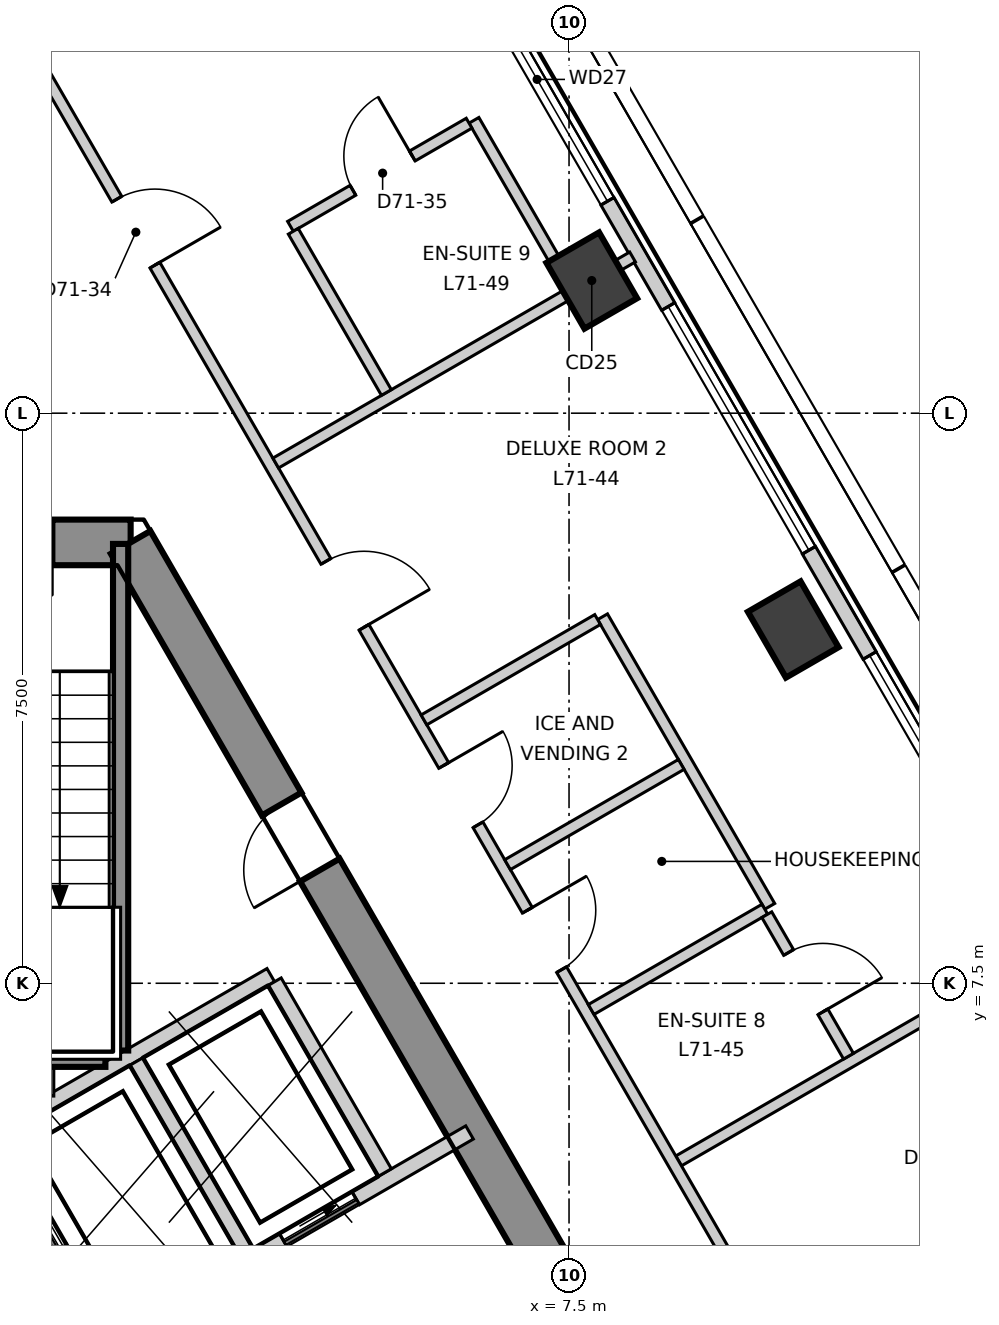
"""IFC4 building model, lengths in metres.
Left out: names, types, materials, properties, quantities, classifications, styles, units other than length and angle.
Written with IfcOpenShell. Run it as: python <this file> out.ifc"""

import sys

from ifc_helpers import new_model, si_unit, direction, frame, frame_2d, origin, origin_2d, place, context, subcontext, project, spatial, polyline, rectangle, outline, extrude, element, fill, save


model = new_model("IFC4")
c1 = context("Model", 3, precision=1e-05, world=origin(), true_north=direction((0.0, 1.0)))
c2 = subcontext(c1, "Body", "Model", "MODEL_VIEW")
j1 = project(units=[si_unit("LENGTHUNIT", "METRE"), si_unit("PLANEANGLEUNIT", "RADIAN")], contexts=[c1])
p1 = place(None, origin())
s1 = spatial("IfcSite", under=j1, at=p1, CompositionType="ELEMENT")
p2 = place(p1, origin())
s2 = spatial("IfcBuilding", under=s1, at=p2, CompositionType="ELEMENT")
p3 = place(p2, frame((0.0, 0.0, 300.7)))
s3 = spatial("IfcBuildingStorey", under=s2, at=p3, CompositionType="ELEMENT", Elevation=300.7)
p4 = place(p3, frame((1.732, 13.3, -0.3), z_axis=(0.0, 0.0, 1.0), x_axis=(-1.0, 0.0, 0.0)))
e1 = element("IfcWall", 1, at=p4, inside=s3, PredefinedType="SHEAR", context=c2, shape_type="SweptSolid", body=[
    extrude(outline(polyline([(-0.173, -0.3), (1.732, -0.3), (3.637, -0.3), (3.291, 0.3), (1.732, 0.3), (0.173, 0.3), (-0.173, -0.3)])), origin(), (0.0, 0.0, 1.0), 3.6),
])
p5 = place(p4, frame((1.032, 0.0, 0.3)))
e2 = element("IfcOpeningElement", 2, at=p5, cuts=e1, PredefinedType="OPENING", context=c2, shape_type="SweptSolid", body=[
    extrude(rectangle(XDim=1.4, YDim=2.1, at=frame_2d((0.7, 1.05))), frame((0.0, 0.31, 0.0), z_axis=(0.0, -1.0, 0.0), x_axis=(1.0, 0.0, 0.0)), (0.0, 0.0, 1.0), 0.62),
])
p6 = place(p3, frame((12.384, -5.15, -0.3), z_axis=(0.0, 0.0, 1.0), x_axis=(-0.500000539815, 0.866025092122, 0.0)))
e3 = element("IfcWall", 3, at=p6, inside=s3, PredefinedType="SHEAR", context=c2, shape_type="SweptSolid", body=[
    extrude(outline(polyline([(-0.173, -0.301), (1.795, -0.301), (3.763, -0.301), (5.731, -0.301), (7.7, -0.301), (9.668, -0.301), (11.636, -0.301), (13.604, -0.3), (15.573, -0.3), (17.541, -0.3), (19.509, -0.3), (21.477, -0.3), (21.131, 0.3), (19.226, 0.3), (17.321, 0.3), (15.415, 0.3), (13.51, 0.3), (11.605, 0.3), (9.699, 0.3), (7.794, 0.3), (5.889, 0.3), (3.984, 0.3), (2.078, 0.3), (0.173, 0.3), (-0.173, -0.301)])), origin(), (0.0, 0.0, 1.0), 3.6),
])
p7 = place(p6, frame((16.328, 0.0, 0.3)))
e4 = element("IfcOpeningElement", 4, at=p7, cuts=e3, PredefinedType="OPENING", context=c2, shape_type="SweptSolid", body=[
    extrude(rectangle(XDim=1.0, YDim=2.1, at=frame_2d((0.5, 1.05))), frame((0.0, 0.31, 0.0), z_axis=(0.0, -1.0, 0.0), x_axis=(1.0, 0.0, 0.0)), (0.0, 0.0, 1.0), 0.621),
])
p8 = place(p6, frame((4.777, 0.0, 0.3)))
e5 = element("IfcOpeningElement", 5, at=p8, cuts=e3, PredefinedType="OPENING", context=c2, shape_type="SweptSolid", body=[
    extrude(rectangle(XDim=0.9, YDim=2.1, at=frame_2d((0.45, 1.05))), frame((0.0, 0.31, 0.0), z_axis=(0.0, -1.0, 0.0), x_axis=(1.0, 0.0, 0.0)), (0.0, 0.0, 1.0), 0.621),
])
for number, where, z_axis, x_axis in (
    (6, (10.45, 12.154, -0.3), (0.0, 0.0, 1.0), (-0.5, 0.866, 0.0)),
    (7, (7.799, 16.745, -0.3), (0.0, 0.0, 1.0), (-0.5, 0.866, 0.0)),
):
    element("IfcColumn", number, at=place(p3, frame(where, z_axis=z_axis, x_axis=x_axis)), inside=s3, PredefinedType="COLUMN", context=c2, shape_type="SweptSolid", body=[
        extrude(rectangle(XDim=1.0, YDim=0.8, at=origin_2d()), origin(), (0.0, 0.0, 1.0), 3.6),
    ])
p9 = place(p3, frame((24.96, -11.578, 0.0), z_axis=(0.0, 0.0, 1.0), x_axis=(-0.500002391419, 0.866024023094, 0.0)))
e8 = element("IfcWall", 8, at=p9, inside=s3, PredefinedType="ELEMENTEDWALL", context=c2, shape_type="SweptSolid", body=[
    extrude(rectangle(XDim=44.994, YDim=0.2, at=frame_2d((22.497, 0.0))), origin(), (0.0, 0.0, 1.0), 3.3),
])
p10 = place(p9, frame((2.103, 0.0, 0.9)))
e9 = element("IfcOpeningElement", 9, at=p10, cuts=e8, PredefinedType="OPENING", context=c2, shape_type="SweptSolid", body=[
    extrude(rectangle(XDim=3.7, YDim=2.2, at=frame_2d((1.85, 1.1))), frame((0.0, 0.11, 0.0), z_axis=(0.0, -1.0, 0.0), x_axis=(1.0, 0.0, 0.0)), (0.0, 0.0, 1.0), 0.22),
])
p11 = place(p9, frame((7.404, 0.0, 0.9)))
e10 = element("IfcOpeningElement", 10, at=p11, cuts=e8, PredefinedType="OPENING", context=c2, shape_type="SweptSolid", body=[
    extrude(rectangle(XDim=3.7, YDim=2.2, at=frame_2d((1.85, 1.1))), frame((0.0, 0.11, 0.0), z_axis=(0.0, -1.0, 0.0), x_axis=(1.0, 0.0, 0.0)), (0.0, 0.0, 1.0), 0.22),
])
p12 = place(p9, frame((12.705, 0.0, 0.9)))
e11 = element("IfcOpeningElement", 11, at=p12, cuts=e8, PredefinedType="OPENING", context=c2, shape_type="SweptSolid", body=[
    extrude(rectangle(XDim=3.7, YDim=2.2, at=frame_2d((1.85, 1.1))), frame((0.0, 0.11, 0.0), z_axis=(0.0, -1.0, 0.0), x_axis=(1.0, 0.0, 0.0)), (0.0, 0.0, 1.0), 0.22),
])
p13 = place(p9, frame((18.006, 0.0, 0.9)))
e12 = element("IfcOpeningElement", 12, at=p13, cuts=e8, PredefinedType="OPENING", context=c2, shape_type="SweptSolid", body=[
    extrude(rectangle(XDim=3.7, YDim=2.2, at=frame_2d((1.85, 1.1))), frame((0.0, 0.11, 0.0), z_axis=(0.0, -1.0, 0.0), x_axis=(1.0, 0.0, 0.0)), (0.0, 0.0, 1.0), 0.22),
])
p14 = place(p9, frame((23.308, 0.0, 0.9)))
e13 = element("IfcOpeningElement", 13, at=p14, cuts=e8, PredefinedType="OPENING", context=c2, shape_type="SweptSolid", body=[
    extrude(rectangle(XDim=3.7, YDim=2.2, at=frame_2d((1.85, 1.1))), frame((0.0, 0.11, 0.0), z_axis=(0.0, -1.0, 0.0), x_axis=(1.0, 0.0, 0.0)), (0.0, 0.0, 1.0), 0.22),
])
p15 = place(p9, frame((28.609, 0.0, 0.9)))
e14 = element("IfcOpeningElement", 14, at=p15, cuts=e8, PredefinedType="OPENING", context=c2, shape_type="SweptSolid", body=[
    extrude(rectangle(XDim=3.7, YDim=2.2, at=frame_2d((1.85, 1.1))), frame((0.0, 0.11, 0.0), z_axis=(0.0, -1.0, 0.0), x_axis=(1.0, 0.0, 0.0)), (0.0, 0.0, 1.0), 0.22),
])
p16 = place(p9, frame((33.91, 0.0, 0.9)))
e15 = element("IfcOpeningElement", 15, at=p16, cuts=e8, PredefinedType="OPENING", context=c2, shape_type="SweptSolid", body=[
    extrude(rectangle(XDim=3.7, YDim=2.2, at=frame_2d((1.85, 1.1))), frame((0.0, 0.11, 0.0), z_axis=(0.0, -1.0, 0.0), x_axis=(1.0, 0.0, 0.0)), (0.0, 0.0, 1.0), 0.22),
])
p17 = place(p9, frame((39.211, 0.0, 0.9)))
e16 = element("IfcOpeningElement", 16, at=p17, cuts=e8, PredefinedType="OPENING", context=c2, shape_type="SweptSolid", body=[
    extrude(rectangle(XDim=3.7, YDim=2.2, at=frame_2d((1.85, 1.1))), frame((0.0, 0.11, 0.0), z_axis=(0.0, -1.0, 0.0), x_axis=(1.0, 0.0, 0.0)), (0.0, 0.0, 1.0), 0.22),
])
p18 = place(p3, frame((8.942, 5.163, 0.0), z_axis=(0.0, 0.0, 1.0), x_axis=(0.866006352826, 0.500032995777, 0.0)))
e17 = element("IfcWall", 17, at=p18, inside=s3, PredefinedType="PARTITIONING", context=c2, shape_type="SweptSolid", body=[
    extrude(rectangle(XDim=5.422, YDim=0.15, at=frame_2d((2.711, 0.0))), origin(), (0.0, 0.0, 1.0), 2.8),
])
p19 = place(p3, frame((0.075, 20.37, 0.0), z_axis=(0.0, 0.0, 1.0), x_axis=(0.500009775255, -0.866019759965, 0.0)))
e18 = element("IfcWall", 18, at=p19, inside=s3, PredefinedType="PARTITIONING", context=c2, shape_type="SweptSolid", body=[
    extrude(rectangle(XDim=35.207, YDim=0.15, at=frame_2d((17.604, 0.0))), origin(), (0.0, 0.0, 1.0), 3.3),
])
p20 = place(p19, frame((31.307, 0.0, 0.0)))
e19 = element("IfcOpeningElement", 19, at=p20, cuts=e18, PredefinedType="OPENING", context=c2, shape_type="SweptSolid", body=[
    extrude(rectangle(XDim=1.0, YDim=2.1, at=frame_2d((0.5, 1.05))), frame((0.0, 0.085, 0.0), z_axis=(0.0, -1.0, 0.0), x_axis=(1.0, 0.0, 0.0)), (0.0, 0.0, 1.0), 0.17),
])
p21 = place(p19, frame((20.355, 0.0, 0.0)))
e20 = element("IfcOpeningElement", 20, at=p21, cuts=e18, PredefinedType="OPENING", context=c2, shape_type="SweptSolid", body=[
    extrude(rectangle(XDim=1.0, YDim=2.1, at=frame_2d((0.5, 1.05))), frame((0.0, 0.085, 0.0), z_axis=(0.0, -1.0, 0.0), x_axis=(1.0, 0.0, 0.0)), (0.0, 0.0, 1.0), 0.17),
])
p22 = place(p19, frame((24.355, 0.0, 0.0)))
e21 = element("IfcOpeningElement", 21, at=p22, cuts=e18, PredefinedType="OPENING", context=c2, shape_type="SweptSolid", body=[
    extrude(rectangle(XDim=0.9, YDim=2.1, at=frame_2d((0.45, 1.05))), frame((0.0, 0.085, 0.0), z_axis=(0.0, -1.0, 0.0), x_axis=(1.0, 0.0, 0.0)), (0.0, 0.0, 1.0), 0.17),
])
p23 = place(p19, frame((22.255, 0.0, 0.0)))
e22 = element("IfcOpeningElement", 22, at=p23, cuts=e18, PredefinedType="OPENING", context=c2, shape_type="SweptSolid", body=[
    extrude(rectangle(XDim=0.9, YDim=2.1, at=frame_2d((0.45, 1.05))), frame((0.0, 0.085, 0.0), z_axis=(0.0, -1.0, 0.0), x_axis=(1.0, 0.0, 0.0)), (0.0, 0.0, 1.0), 0.17),
])
p24 = place(p19, frame((8.453, 0.0, 0.0)))
e23 = element("IfcOpeningElement", 23, at=p24, cuts=e18, PredefinedType="OPENING", context=c2, shape_type="SweptSolid", body=[
    extrude(rectangle(XDim=1.0, YDim=2.1, at=frame_2d((0.5, 1.05))), frame((0.0, 0.085, 0.0), z_axis=(0.0, -1.0, 0.0), x_axis=(1.0, 0.0, 0.0)), (0.0, 0.0, 1.0), 0.17),
])
p25 = place(p19, frame((13.753, 0.0, 0.0)))
e24 = element("IfcOpeningElement", 24, at=p25, cuts=e18, PredefinedType="OPENING", context=c2, shape_type="SweptSolid", body=[
    extrude(rectangle(XDim=0.9, YDim=2.1, at=frame_2d((0.45, 1.05))), frame((0.0, 0.085, 0.0), z_axis=(0.0, -1.0, 0.0), x_axis=(1.0, 0.0, 0.0)), (0.0, 0.0, 1.0), 0.17),
])
p26 = place(p19, frame((11.553, 0.0, 0.0)))
e25 = element("IfcOpeningElement", 25, at=p26, cuts=e18, PredefinedType="OPENING", context=c2, shape_type="SweptSolid", body=[
    extrude(rectangle(XDim=0.9, YDim=2.1, at=frame_2d((0.45, 1.05))), frame((0.0, 0.085, 0.0), z_axis=(0.0, -1.0, 0.0), x_axis=(1.0, 0.0, 0.0)), (0.0, 0.0, 1.0), 0.17),
])
p27 = place(p19, frame((2.951, 0.0, 0.0)))
e26 = element("IfcOpeningElement", 26, at=p27, cuts=e18, PredefinedType="OPENING", context=c2, shape_type="SweptSolid", body=[
    extrude(rectangle(XDim=1.0, YDim=2.1, at=frame_2d((0.5, 1.05))), frame((0.0, 0.085, 0.0), z_axis=(0.0, -1.0, 0.0), x_axis=(1.0, 0.0, 0.0)), (0.0, 0.0, 1.0), 0.17),
])
p28 = place(p3, frame((3.641, 14.344, 0.0), z_axis=(0.0, 0.0, 1.0), x_axis=(0.865995092734, 0.500052496605, 0.0)))
e27 = element("IfcWall", 27, at=p28, inside=s3, PredefinedType="PARTITIONING", context=c2, shape_type="SweptSolid", body=[
    extrude(rectangle(XDim=5.421, YDim=0.15, at=frame_2d((2.711, 0.0))), origin(), (0.0, 0.0, 1.0), 3.3),
])
p29 = place(p3, frame((7.941, 12.322, 0.0), z_axis=(0.0, 0.0, 1.0), x_axis=(0.500077893725, -0.86598042715, 0.0)))
e28 = element("IfcWall", 28, at=p29, inside=s3, PredefinedType="PARTITIONING", context=c2, shape_type="SweptSolid", body=[
    extrude(rectangle(XDim=4.4, YDim=0.15, at=frame_2d((2.2, 0.0))), origin(), (0.0, 0.0, 1.0), 3.3),
])
p30 = place(p3, frame((5.591, 10.965, 0.0), z_axis=(0.0, 0.0, 1.0), x_axis=(0.86592206805, 0.500178940045, 0.0)))
e29 = element("IfcWall", 29, at=p30, inside=s3, PredefinedType="PARTITIONING", context=c2, shape_type="SweptSolid", body=[
    extrude(rectangle(XDim=2.639, YDim=0.15, at=frame_2d((1.319, 0.0))), origin(), (0.0, 0.0, 1.0), 3.3),
])
for number, where, z_axis, x_axis in (
    (30, (6.691, 9.06, 0.0), (0.0, 0.0, 1.0), (0.866, 0.5, 0.0)),
    (31, (7.791, 7.155, 0.0), (0.0, 0.0, 1.0), (0.866, 0.5, 0.0)),
):
    element("IfcWall", number, at=place(p3, frame(where, z_axis=z_axis, x_axis=x_axis)), inside=s3, PredefinedType="PARTITIONING", context=c2, shape_type="SweptSolid", body=[
        extrude(rectangle(XDim=2.638, YDim=0.15, at=frame_2d((1.319, 0.0))), origin(), (0.0, 0.0, 1.0), 3.3),
    ])
p31 = place(p3, frame((6.249, 18.853, 0.0), z_axis=(0.0, 0.0, 1.0), x_axis=(0.500079482444, -0.865979509711, 0.0)))
e32 = element("IfcWall", 32, at=p31, inside=s3, PredefinedType="PARTITIONING", context=c2, shape_type="SweptSolid", body=[
    extrude(rectangle(XDim=2.525, YDim=0.15, at=frame_2d((1.263, 0.0))), origin(), (0.0, 0.0, 1.0), 2.6),
])
p32 = place(p3, frame((3.835, 17.458, 0.0), z_axis=(0.0, 0.0, 1.0), x_axis=(0.866008795918, 0.500028764566, 0.0)))
e33 = element("IfcWall", 33, at=p32, inside=s3, PredefinedType="PARTITIONING", context=c2, shape_type="SweptSolid", body=[
    extrude(rectangle(XDim=2.714, YDim=0.15, at=frame_2d((1.357, 0.0))), origin(), (0.0, 0.0, 1.0), 3.3),
])
p33 = place(p32, frame((0.95, 0.0, 0.0)))
e34 = element("IfcOpeningElement", 34, at=p33, cuts=e33, PredefinedType="OPENING", context=c2, shape_type="SweptSolid", body=[
    extrude(rectangle(XDim=0.9, YDim=2.1, at=frame_2d((0.45, 1.05))), frame((0.0, 0.085, 0.0), z_axis=(0.0, -1.0, 0.0), x_axis=(1.0, 0.0, 0.0)), (0.0, 0.0, 1.0), 0.17),
])
p34 = place(p3, frame((3.872, 17.393, 0.0), z_axis=(0.0, 0.0, 1.0), x_axis=(0.500073324283, -0.865983065851, 0.0)))
e35 = element("IfcWall", 35, at=p34, inside=s3, PredefinedType="PARTITIONING", context=c2, shape_type="SweptSolid", body=[
    extrude(rectangle(XDim=2.449, YDim=0.15, at=frame_2d((1.225, 0.0))), origin(), (0.0, 0.0, 1.0), 3.3),
])
p35 = place(p3, frame((10.102, 8.402, 0.0), z_axis=(0.0, 0.0, 1.0), x_axis=(0.499961633463, -0.866047553582, 0.0)))
e36 = element("IfcWall", 36, at=p35, inside=s3, PredefinedType="PARTITIONING", context=c2, shape_type="SweptSolid", body=[
    extrude(rectangle(XDim=2.15, YDim=0.15, at=frame_2d((1.075, 0.0))), origin(), (0.0, 0.0, 1.0), 3.3),
])
p36 = place(p35, frame((0.575, 0.0, 0.0)))
e37 = element("IfcOpeningElement", 37, at=p36, cuts=e36, PredefinedType="OPENING", context=c2, shape_type="SweptSolid", body=[
    extrude(rectangle(XDim=0.9, YDim=2.1, at=frame_2d((0.45, 1.05))), frame((0.0, 0.085, 0.0), z_axis=(0.0, -1.0, 0.0), x_axis=(1.0, 0.0, 0.0)), (0.0, 0.0, 1.0), 0.17),
])
p37 = place(p3, frame((-0.002, 5.541, 0.0), z_axis=(0.0, 0.0, 1.0), x_axis=(0.86600155993, 0.500041296494, 0.0)))
e38 = element("IfcWall", 38, at=p37, inside=s3, PredefinedType="SOLIDWALL", context=c2, shape_type="SweptSolid", body=[
    extrude(rectangle(XDim=4.132, YDim=0.2, at=frame_2d((2.066, 0.0))), origin(), (0.0, 0.0, 1.0), 3.3),
])
p38 = place(p3, frame((0.0, 5.4, 0.0), z_axis=(0.0, 0.0, 1.0), x_axis=(0.500103862429, -0.865965430478, 0.0)))
e39 = element("IfcWall", 39, at=p38, inside=s3, PredefinedType="SOLIDWALL", context=c2, shape_type="SweptSolid", body=[
    extrude(rectangle(XDim=2.973, YDim=0.2, at=frame_2d((1.487, 0.0))), origin(), (0.0, 0.0, 1.0), 3.3),
])
p39 = place(p38, frame((0.937, 0.0, 0.0)))
e40 = element("IfcOpeningElement", 40, at=p39, cuts=e39, PredefinedType="OPENING", context=c2, shape_type="SweptSolid", body=[
    extrude(rectangle(XDim=1.1, YDim=2.1, at=frame_2d((0.55, 1.05))), frame((0.0, 0.11, 0.0), z_axis=(0.0, -1.0, 0.0), x_axis=(1.0, 0.0, 0.0)), (0.0, 0.0, 1.0), 0.22),
])
p40 = place(p3, frame((1.578, 2.874, 0.0), z_axis=(0.0, 0.0, 1.0), x_axis=(0.866045911672, 0.499964477614, 0.0)))
e41 = element("IfcWall", 41, at=p40, inside=s3, PredefinedType="SOLIDWALL", context=c2, shape_type="SweptSolid", body=[
    extrude(rectangle(XDim=5.327, YDim=0.2, at=frame_2d((2.663, 0.0))), origin(), (0.0, 0.0, 1.0), 3.3),
])
p41 = place(p40, frame((2.496, 0.0, 0.0)))
e42 = element("IfcOpeningElement", 42, at=p41, cuts=e41, PredefinedType="OPENING", context=c2, shape_type="SweptSolid", body=[
    extrude(rectangle(XDim=1.1, YDim=2.1, at=frame_2d((0.55, 1.05))), frame((0.0, 0.11, 0.0), z_axis=(0.0, -1.0, 0.0), x_axis=(1.0, 0.0, 0.0)), (0.0, 0.0, 1.0), 0.22),
])
for number, where, z_axis, x_axis in (
    (43, (3.626, 7.52, 0.0), (0.0, 0.0, 1.0), (0.5, -0.866, 0.0)),
    (44, (1.807, 6.47, 0.0), (0.0, 0.0, 1.0), (0.5, -0.866, 0.0)),
):
    element("IfcWall", number, at=place(p3, frame(where, z_axis=z_axis, x_axis=x_axis)), inside=s3, PredefinedType="SOLIDWALL", context=c2, shape_type="SweptSolid", body=[
        extrude(rectangle(XDim=2.9, YDim=0.2, at=frame_2d((1.45, 0.0))), origin(), (0.0, 0.0, 1.0), 3.3),
    ])
p42 = place(p3, frame((0.621, 6.016, 0.0), z_axis=(0.0, 0.0, 1.0), x_axis=(0.0, 1.0, 0.0)))
e45 = element("IfcWall", 45, at=p42, inside=s3, PredefinedType="SOLIDWALL", context=c2, shape_type="SweptSolid", body=[
    extrude(rectangle(XDim=0.384, YDim=0.2, at=frame_2d((0.192, 0.0))), origin(), (0.0, 0.0, 1.0), 3.3),
])
p43 = place(p3, frame((1.6, 6.615, 0.0), z_axis=(0.0, 0.0, 1.0), x_axis=(0.0, 1.0, 0.0)))
e46 = element("IfcWall", 46, at=p43, inside=s3, PredefinedType="SOLIDWALL", context=c2, shape_type="SweptSolid", body=[
    extrude(rectangle(XDim=6.665, YDim=0.2, at=frame_2d((3.333, 0.0))), origin(), (0.0, 0.0, 1.0), 3.3),
])
p44 = place(p3, frame((-1.4, 6.5, 0.0), z_axis=(0.0, 0.0, 1.0), x_axis=(1.0, 0.0, 0.0)))
e47 = element("IfcWall", 47, at=p44, inside=s3, PredefinedType="SOLIDWALL", context=c2, shape_type="SweptSolid", body=[
    extrude(rectangle(XDim=2.8, YDim=0.2, at=frame_2d((1.4, 0.0))), origin(), (0.0, 0.0, 1.0), 3.3),
])
p45 = place(p14, origin())
e48 = element("IfcWindow", 48, at=p45, inside=s3, PartitioningType="SINGLE_PANEL", PredefinedType="WINDOW", context=c2, shape_type="SweptSolid", body=[
    extrude(rectangle(XDim=3.7, YDim=2.2, at=frame_2d((1.85, 1.1))), frame((0.0, 0.03, 0.0), z_axis=(0.0, -1.0, 0.0), x_axis=(1.0, 0.0, 0.0)), (0.0, 0.0, 1.0), 0.06),
])
fill(e13, e48)
p46 = place(p15, origin())
e49 = element("IfcWindow", 49, at=p46, inside=s3, PartitioningType="SINGLE_PANEL", PredefinedType="WINDOW", context=c2, shape_type="SweptSolid", body=[
    extrude(rectangle(XDim=3.7, YDim=2.2, at=frame_2d((1.85, 1.1))), frame((0.0, 0.03, 0.0), z_axis=(0.0, -1.0, 0.0), x_axis=(1.0, 0.0, 0.0)), (0.0, 0.0, 1.0), 0.06),
])
fill(e14, e49)
p47 = place(p16, origin())
e50 = element("IfcWindow", 50, at=p47, inside=s3, PartitioningType="SINGLE_PANEL", PredefinedType="WINDOW", context=c2, shape_type="SweptSolid", body=[
    extrude(rectangle(XDim=3.7, YDim=2.2, at=frame_2d((1.85, 1.1))), frame((0.0, 0.03, 0.0), z_axis=(0.0, -1.0, 0.0), x_axis=(1.0, 0.0, 0.0)), (0.0, 0.0, 1.0), 0.06),
])
fill(e15, e50)
p48 = place(p39, origin())
e51 = element("IfcDoor", 51, at=p48, inside=s3, OperationType="SLIDING_TO_LEFT", PredefinedType="DOOR", context=c2, shape_type="SweptSolid", body=[
    extrude(rectangle(XDim=1.1, YDim=2.1, at=frame_2d((0.55, 1.05))), frame((0.0, 0.025, 0.0), z_axis=(0.0, -1.0, 0.0), x_axis=(1.0, 0.0, 0.0)), (0.0, 0.0, 1.0), 0.05),
])
fill(e40, e51)
p49 = place(p41, origin())
e52 = element("IfcDoor", 52, at=p49, inside=s3, OperationType="SLIDING_TO_LEFT", PredefinedType="DOOR", context=c2, shape_type="SweptSolid", body=[
    extrude(rectangle(XDim=1.1, YDim=2.1, at=frame_2d((0.55, 1.05))), frame((0.0, 0.025, 0.0), z_axis=(0.0, -1.0, 0.0), x_axis=(1.0, 0.0, 0.0)), (0.0, 0.0, 1.0), 0.05),
])
fill(e42, e52)
p50 = place(p24, origin())
e53 = element("IfcDoor", 53, at=p50, inside=s3, OperationType="SINGLE_SWING_LEFT", PredefinedType="DOOR", context=c2, shape_type="SweptSolid", body=[
    extrude(rectangle(XDim=1.0, YDim=2.1, at=frame_2d((0.5, 1.05))), frame((0.0, 0.025, 0.0), z_axis=(0.0, -1.0, 0.0), x_axis=(1.0, 0.0, 0.0)), (0.0, 0.0, 1.0), 0.05),
])
fill(e23, e53)
p51 = place(p36, origin())
e54 = element("IfcDoor", 54, at=p51, inside=s3, OperationType="SINGLE_SWING_LEFT", PredefinedType="DOOR", context=c2, shape_type="SweptSolid", body=[
    extrude(rectangle(XDim=0.9, YDim=2.1, at=frame_2d((0.45, 1.05))), frame((0.0, 0.025, 0.0), z_axis=(0.0, -1.0, 0.0), x_axis=(1.0, 0.0, 0.0)), (0.0, 0.0, 1.0), 0.05),
])
fill(e37, e54)
p52 = place(p25, origin())
e55 = element("IfcDoor", 55, at=p52, inside=s3, OperationType="SINGLE_SWING_RIGHT", PredefinedType="DOOR", context=c2, shape_type="SweptSolid", body=[
    extrude(rectangle(XDim=0.9, YDim=2.1, at=frame_2d((0.45, 1.05))), frame((0.0, 0.025, 0.0), z_axis=(0.0, -1.0, 0.0), x_axis=(1.0, 0.0, 0.0)), (0.0, 0.0, 1.0), 0.05),
])
fill(e24, e55)
p53 = place(p26, origin())
e56 = element("IfcDoor", 56, at=p53, inside=s3, OperationType="SINGLE_SWING_RIGHT", PredefinedType="DOOR", context=c2, shape_type="SweptSolid", body=[
    extrude(rectangle(XDim=0.9, YDim=2.1, at=frame_2d((0.45, 1.05))), frame((0.0, 0.025, 0.0), z_axis=(0.0, -1.0, 0.0), x_axis=(1.0, 0.0, 0.0)), (0.0, 0.0, 1.0), 0.05),
])
fill(e25, e56)
p54 = place(p27, origin())
e57 = element("IfcDoor", 57, at=p54, inside=s3, OperationType="SINGLE_SWING_LEFT", PredefinedType="DOOR", context=c2, shape_type="SweptSolid", body=[
    extrude(rectangle(XDim=1.0, YDim=2.1, at=frame_2d((0.5, 1.05))), frame((0.0, 0.025, 0.0), z_axis=(0.0, -1.0, 0.0), x_axis=(1.0, 0.0, 0.0)), (0.0, 0.0, 1.0), 0.05),
])
fill(e26, e57)
p55 = place(p33, origin())
e58 = element("IfcDoor", 58, at=p55, inside=s3, OperationType="SINGLE_SWING_LEFT", PredefinedType="DOOR", context=c2, shape_type="SweptSolid", body=[
    extrude(rectangle(XDim=0.9, YDim=2.1, at=frame_2d((0.45, 1.05))), frame((0.0, 0.025, 0.0), z_axis=(0.0, -1.0, 0.0), x_axis=(1.0, 0.0, 0.0)), (0.0, 0.0, 1.0), 0.05),
])
fill(e34, e58)
p56 = place(p7, origin())
e59 = element("IfcDoor", 59, at=p56, inside=s3, OperationType="SINGLE_SWING_RIGHT", PredefinedType="DOOR", context=c2, shape_type="SweptSolid", body=[
    extrude(rectangle(XDim=1.0, YDim=2.1, at=frame_2d((0.5, 1.05))), frame((0.0, 0.025, 0.0), z_axis=(0.0, -1.0, 0.0), x_axis=(1.0, 0.0, 0.0)), (0.0, 0.0, 1.0), 0.05),
])
fill(e4, e59)
save(model, sys.argv[1])
